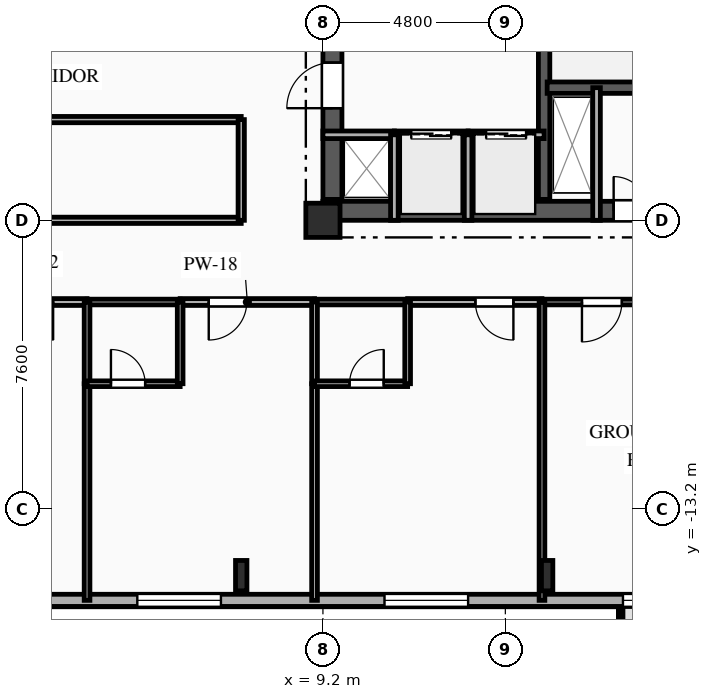
"""IFC4 building model, lengths in metres.
Left out: names, types, materials, properties, quantities, classifications, styles, units other than length and angle.
Written with IfcOpenShell. Run it as: python <this file> out.ifc"""

import sys

from ifc_helpers import new_model, si_unit, direction, frame, frame_2d, origin, origin_2d, place, context, subcontext, project, spatial, rectangle, i_section, extrude, element, fill, save


model = new_model("IFC4")
c1 = context("Model", 3, precision=1e-05, world=origin(), true_north=direction((0.0, 1.0)))
c2 = subcontext(c1, "Body", "Model", "MODEL_VIEW")
j1 = project(units=[si_unit("LENGTHUNIT", "METRE"), si_unit("PLANEANGLEUNIT", "RADIAN")], contexts=[c1])
p1 = place(None, origin())
s1 = spatial("IfcSite", under=j1, at=p1, CompositionType="ELEMENT")
p2 = place(p1, origin())
s2 = spatial("IfcBuilding", under=s1, at=p2, CompositionType="ELEMENT")
p3 = place(p2, frame((0.0, 0.0, 154.45)))
s3 = spatial("IfcBuildingStorey", under=s2, at=p3, CompositionType="ELEMENT", Elevation=154.45)
p4 = place(p3, frame((9.2, -5.6, 0.0), z_axis=(0.0, 0.0, 1.0), x_axis=(1.0, 0.0, 0.0)))
e1 = element("IfcColumn", 1, at=p4, inside=s3, PredefinedType="COLUMN", context=c2, shape_type="SweptSolid", body=[
    extrude(rectangle(XDim=0.9, YDim=0.9, at=origin_2d()), origin(), (0.0, 0.0, 1.0), 3.35),
])
for number, where, z_axis, x_axis in (
    (2, (7.05, -14.95, 0.0), (0.0, 0.0, 1.0), (1.0, 0.0, 0.0)),
    (3, (15.1, -14.95, 0.0), (0.0, 0.0, 1.0), (1.0, 0.0, 0.0)),
):
    element("IfcColumn", number, at=place(p3, frame(where, z_axis=z_axis, x_axis=x_axis)), inside=s3, PredefinedType="COLUMN", context=c2, shape_type="SweptSolid", body=[
        extrude(i_section(OverallWidth=0.3, OverallDepth=0.8, WebThickness=0.018, FlangeThickness=0.033, FilletRadius=0.03, at=origin_2d()), origin(), (0.0, 0.0, 1.0), 3.35),
    ])
p5 = place(p3, frame((23.8, -15.6, 0.0), z_axis=(0.0, 0.0, 1.0), x_axis=(-1.0, 0.0, 0.0)))
e4 = element("IfcWall", 4, at=p5, inside=s3, PredefinedType="SOLIDWALL", context=c2, shape_type="SweptSolid", body=[
    extrude(rectangle(XDim=49.6, YDim=0.32, at=frame_2d((24.8, 0.0))), origin(), (0.0, 0.0, 1.0), 3.04),
])
p6 = place(p5, frame((1.13, 0.0, 0.85)))
e5 = element("IfcOpeningElement", 5, at=p6, cuts=e4, PredefinedType="OPENING", context=c2, shape_type="SweptSolid", body=[
    extrude(rectangle(XDim=1.1, YDim=1.85, at=frame_2d((0.55, 0.925))), frame((0.0, 0.17, 0.0), z_axis=(0.0, -1.0, 0.0), x_axis=(1.0, 0.0, 0.0)), (0.0, 0.0, 1.0), 0.34),
])
p7 = place(p5, frame((5.055, 0.0, 0.85)))
e6 = element("IfcOpeningElement", 6, at=p7, cuts=e4, PredefinedType="OPENING", context=c2, shape_type="SweptSolid", body=[
    extrude(rectangle(XDim=1.65, YDim=1.85, at=frame_2d((0.825, 0.925))), frame((0.0, 0.17, 0.0), z_axis=(0.0, -1.0, 0.0), x_axis=(1.0, 0.0, 0.0)), (0.0, 0.0, 1.0), 0.34),
])
p8 = place(p5, frame((10.78, 0.0, 0.85)))
e7 = element("IfcOpeningElement", 7, at=p8, cuts=e4, PredefinedType="OPENING", context=c2, shape_type="SweptSolid", body=[
    extrude(rectangle(XDim=2.2, YDim=1.85, at=frame_2d((1.1, 0.925))), frame((0.0, 0.17, 0.0), z_axis=(0.0, -1.0, 0.0), x_axis=(1.0, 0.0, 0.0)), (0.0, 0.0, 1.0), 0.34),
])
p9 = place(p5, frame((17.284, 0.0, 0.85)))
e8 = element("IfcOpeningElement", 8, at=p9, cuts=e4, PredefinedType="OPENING", context=c2, shape_type="SweptSolid", body=[
    extrude(rectangle(XDim=2.2, YDim=1.85, at=frame_2d((1.1, 0.925))), frame((0.0, 0.17, 0.0), z_axis=(0.0, -1.0, 0.0), x_axis=(1.0, 0.0, 0.0)), (0.0, 0.0, 1.0), 0.34),
])
p10 = place(p5, frame((22.248, 0.0, 0.85)))
e9 = element("IfcOpeningElement", 9, at=p10, cuts=e4, PredefinedType="OPENING", context=c2, shape_type="SweptSolid", body=[
    extrude(rectangle(XDim=2.2, YDim=1.85, at=frame_2d((1.1, 0.925))), frame((0.0, 0.17, 0.0), z_axis=(0.0, -1.0, 0.0), x_axis=(1.0, 0.0, 0.0)), (0.0, 0.0, 1.0), 0.34),
])
p11 = place(p5, frame((28.7, 0.0, 0.85)))
e10 = element("IfcOpeningElement", 10, at=p11, cuts=e4, PredefinedType="OPENING", context=c2, shape_type="SweptSolid", body=[
    extrude(rectangle(XDim=2.2, YDim=1.85, at=frame_2d((1.1, 0.925))), frame((0.0, 0.17, 0.0), z_axis=(0.0, -1.0, 0.0), x_axis=(1.0, 0.0, 0.0)), (0.0, 0.0, 1.0), 0.34),
])
p12 = place(p5, frame((34.7, 0.0, 0.85)))
e11 = element("IfcOpeningElement", 11, at=p12, cuts=e4, PredefinedType="OPENING", context=c2, shape_type="SweptSolid", body=[
    extrude(rectangle(XDim=2.2, YDim=1.85, at=frame_2d((1.1, 0.925))), frame((0.0, 0.17, 0.0), z_axis=(0.0, -1.0, 0.0), x_axis=(1.0, 0.0, 0.0)), (0.0, 0.0, 1.0), 0.34),
])
p13 = place(p5, frame((41.492, 0.0, 0.85)))
e12 = element("IfcOpeningElement", 12, at=p13, cuts=e4, PredefinedType="OPENING", context=c2, shape_type="SweptSolid", body=[
    extrude(rectangle(XDim=1.65, YDim=1.85, at=frame_2d((0.825, 0.925))), frame((0.0, 0.17, 0.0), z_axis=(0.0, -1.0, 0.0), x_axis=(1.0, 0.0, 0.0)), (0.0, 0.0, 1.0), 0.34),
])
p14 = place(p5, frame((46.175, 0.0, 0.85)))
e13 = element("IfcOpeningElement", 13, at=p14, cuts=e4, PredefinedType="OPENING", context=c2, shape_type="SweptSolid", body=[
    extrude(rectangle(XDim=1.65, YDim=1.85, at=frame_2d((0.825, 0.925))), frame((0.0, 0.17, 0.0), z_axis=(0.0, -1.0, 0.0), x_axis=(1.0, 0.0, 0.0)), (0.0, 0.0, 1.0), 0.34),
])
p15 = place(p3, frame((9.2, -5.35, 0.0), z_axis=(0.0, 0.0, 1.0), x_axis=(1.0, 0.0, 0.0)))
e14 = element("IfcWall", 14, at=p15, inside=s3, PredefinedType="SHEAR", context=c2, shape_type="SweptSolid", body=[
    extrude(rectangle(XDim=9.6, YDim=0.5, at=frame_2d((4.8, 0.0))), origin(), (0.0, 0.0, 1.0), 3.04),
])
p16 = place(p15, frame((7.65, 0.0, 0.0)))
e15 = element("IfcOpeningElement", 15, at=p16, cuts=e14, PredefinedType="OPENING", context=c2, shape_type="SweptSolid", body=[
    extrude(rectangle(XDim=0.9, YDim=2.1, at=frame_2d((0.45, 1.05))), frame((0.0, 0.26, 0.0), z_axis=(0.0, -1.0, 0.0), x_axis=(1.0, 0.0, 0.0)), (0.0, 0.0, 1.0), 0.52),
])
p17 = place(p3, frame((9.45, -5.05, 0.0), z_axis=(0.0, 0.0, 1.0), x_axis=(0.0, 1.0, 0.0)))
e16 = element("IfcWall", 16, at=p17, inside=s3, PredefinedType="SHEAR", context=c2, shape_type="SweptSolid", body=[
    extrude(rectangle(XDim=10.1, YDim=0.5, at=frame_2d((5.05, 0.0))), origin(), (0.0, 0.0, 1.0), 3.04),
])
p18 = place(p17, frame((7.15, 0.0, 0.0)))
e17 = element("IfcOpeningElement", 17, at=p18, cuts=e16, PredefinedType="OPENING", context=c2, shape_type="SweptSolid", body=[
    extrude(rectangle(XDim=0.9, YDim=2.1, at=frame_2d((0.45, 1.05))), frame((0.0, 0.26, 0.0), z_axis=(0.0, -1.0, 0.0), x_axis=(1.0, 0.0, 0.0)), (0.0, 0.0, 1.0), 0.52),
])
p19 = place(p17, frame((2.4, 0.0, 0.0)))
e18 = element("IfcOpeningElement", 18, at=p19, cuts=e16, PredefinedType="OPENING", context=c2, shape_type="SweptSolid", body=[
    extrude(rectangle(XDim=1.2, YDim=2.15, at=frame_2d((0.6, 1.075))), frame((0.0, 0.26, 0.0), z_axis=(0.0, -1.0, 0.0), x_axis=(1.0, 0.0, 0.0)), (0.0, 0.0, 1.0), 0.52),
])
p20 = place(p3, frame((15.02, -5.05, 0.0), z_axis=(0.0, 0.0, 1.0), x_axis=(0.0, 1.0, 0.0)))
e19 = element("IfcWall", 19, at=p20, inside=s3, PredefinedType="SHEAR", context=c2, shape_type="SweptSolid", body=[
    extrude(rectangle(XDim=10.1, YDim=0.3, at=frame_2d((5.05, 0.0))), origin(), (0.0, 0.0, 1.0), 3.04),
])
p21 = place(p3, frame((15.1, -2.11, 0.0), z_axis=(0.0, 0.0, 1.0), x_axis=(1.0, 0.0, 0.0)))
e20 = element("IfcWall", 20, at=p21, inside=s3, PredefinedType="SHEAR", context=c2, shape_type="SweptSolid", body=[
    extrude(rectangle(XDim=3.18, YDim=0.3, at=frame_2d((1.59, 0.0))), origin(), (0.0, 0.0, 1.0), 3.04),
])
p22 = place(p3, frame((16.4, -2.11, 0.0), z_axis=(0.0, 0.0, 1.0), x_axis=(0.0, -1.0, 0.0)))
e21 = element("IfcWall", 21, at=p22, inside=s3, PredefinedType="PARTITIONING", context=c2, shape_type="SweptSolid", body=[
    extrude(rectangle(XDim=3.49, YDim=0.2, at=frame_2d((1.745, 0.0))), origin(), (0.0, 0.0, 1.0), 3.04),
])
p23 = place(p3, frame((9.2, -3.35, 0.0), z_axis=(0.0, 0.0, 1.0), x_axis=(1.0, 0.0, 0.0)))
e22 = element("IfcWall", 22, at=p23, inside=s3, PredefinedType="PARTITIONING", context=c2, shape_type="SweptSolid", body=[
    extrude(rectangle(XDim=1.88, YDim=0.2, at=frame_2d((0.94, 0.0))), origin(), (0.0, 0.0, 1.0), 2.755),
])
p24 = place(p3, frame((11.08, -3.35, 0.0), z_axis=(0.0, 0.0, 1.0), x_axis=(1.0, 0.0, 0.0)))
e23 = element("IfcWall", 23, at=p24, inside=s3, PredefinedType="PARTITIONING", context=c2, shape_type="SweptSolid", body=[
    extrude(rectangle(XDim=1.94, YDim=0.2, at=frame_2d((0.97, 0.0))), origin(), (0.0, 0.0, 1.0), 3.04),
])
p25 = place(p24, frame((0.445, 0.0, 0.0)))
e24 = element("IfcOpeningElement", 24, at=p25, cuts=e23, PredefinedType="OPENING", context=c2, shape_type="SweptSolid", body=[
    extrude(rectangle(XDim=1.05, YDim=2.1, at=frame_2d((0.525, 1.05))), frame((0.0, 0.11, 0.0), z_axis=(0.0, -1.0, 0.0), x_axis=(1.0, 0.0, 0.0)), (0.0, 0.0, 1.0), 0.22),
])
p26 = place(p3, frame((13.02, -3.35, 0.0), z_axis=(0.0, 0.0, 1.0), x_axis=(1.0, 0.0, 0.0)))
e25 = element("IfcWall", 25, at=p26, inside=s3, PredefinedType="PARTITIONING", context=c2, shape_type="SweptSolid", body=[
    extrude(rectangle(XDim=2.0, YDim=0.2, at=frame_2d((1.0, 0.0))), origin(), (0.0, 0.0, 1.0), 3.04),
])
p27 = place(p26, frame((0.475, 0.0, 0.0)))
e26 = element("IfcOpeningElement", 26, at=p27, cuts=e25, PredefinedType="OPENING", context=c2, shape_type="SweptSolid", body=[
    extrude(rectangle(XDim=1.05, YDim=2.1, at=frame_2d((0.525, 1.05))), frame((0.0, 0.11, 0.0), z_axis=(0.0, -1.0, 0.0), x_axis=(1.0, 0.0, 0.0)), (0.0, 0.0, 1.0), 0.22),
])
for number, where, z_axis, x_axis in (
    (27, (11.08, -5.6, 0.0), (0.0, 0.0, 1.0), (0.0, 1.0, 0.0)),
    (28, (13.02, -5.6, 0.0), (0.0, 0.0, 1.0), (0.0, 1.0, 0.0)),
):
    element("IfcWall", number, at=place(p3, frame(where, z_axis=z_axis, x_axis=x_axis)), inside=s3, PredefinedType="PARTITIONING", context=c2, shape_type="SweptSolid", body=[
        extrude(rectangle(XDim=2.25, YDim=0.2, at=frame_2d((1.125, 0.0))), origin(), (0.0, 0.0, 1.0), 3.04),
    ])
p28 = place(p3, frame((2.993, -7.75, 0.0), z_axis=(0.0, 0.0, 1.0), x_axis=(-1.0, 0.0, 0.0)))
e29 = element("IfcWall", 29, at=p28, inside=s3, PredefinedType="PARTITIONING", context=c2, shape_type="SweptSolid", body=[
    extrude(rectangle(XDim=2.993, YDim=0.18, at=frame_2d((1.497, 0.0))), origin(), (0.0, 0.0, 1.0), 3.04),
])
p29 = place(p28, frame((0.892, 0.0, 0.0)))
e30 = element("IfcOpeningElement", 30, at=p29, cuts=e29, PredefinedType="OPENING", context=c2, shape_type="SweptSolid", body=[
    extrude(rectangle(XDim=1.0, YDim=2.15, at=frame_2d((0.5, 1.075))), frame((0.0, 0.1, 0.0), z_axis=(0.0, -1.0, 0.0), x_axis=(1.0, 0.0, 0.0)), (0.0, 0.0, 1.0), 0.2),
])
p30 = place(p3, frame((8.979, -7.75, 0.0), z_axis=(0.0, 0.0, 1.0), x_axis=(-1.0, 0.0, 0.0)))
e31 = element("IfcWall", 31, at=p30, inside=s3, PredefinedType="PARTITIONING", context=c2, shape_type="SweptSolid", body=[
    extrude(rectangle(XDim=3.536, YDim=0.18, at=frame_2d((1.768, 0.0))), origin(), (0.0, 0.0, 1.0), 3.04),
])
p31 = place(p30, frame((1.784, 0.0, 0.0)))
e32 = element("IfcOpeningElement", 32, at=p31, cuts=e31, PredefinedType="OPENING", context=c2, shape_type="SweptSolid", body=[
    extrude(rectangle(XDim=1.0, YDim=2.15, at=frame_2d((0.5, 1.075))), frame((0.0, 0.1, 0.0), z_axis=(0.0, -1.0, 0.0), x_axis=(1.0, 0.0, 0.0)), (0.0, 0.0, 1.0), 0.2),
])
p32 = place(p3, frame((5.443, -7.75, 0.0), z_axis=(0.0, 0.0, 1.0), x_axis=(-1.0, 0.0, 0.0)))
e33 = element("IfcWall", 33, at=p32, inside=s3, PredefinedType="PLUMBINGWALL", context=c2, shape_type="SweptSolid", body=[
    extrude(rectangle(XDim=2.45, YDim=0.15, at=frame_2d((1.225, 0.0))), origin(), (0.0, 0.0, 1.0), 3.04),
])
p33 = place(p3, frame((14.964, -7.75, 0.0), z_axis=(0.0, 0.0, 1.0), x_axis=(-1.0, 0.0, 0.0)))
e34 = element("IfcWall", 34, at=p33, inside=s3, PredefinedType="PARTITIONING", context=c2, shape_type="SweptSolid", body=[
    extrude(rectangle(XDim=3.535, YDim=0.18, at=frame_2d((1.768, 0.0))), origin(), (0.0, 0.0, 1.0), 3.04),
])
p34 = place(p33, frame((0.752, 0.0, 0.0)))
e35 = element("IfcOpeningElement", 35, at=p34, cuts=e34, PredefinedType="OPENING", context=c2, shape_type="SweptSolid", body=[
    extrude(rectangle(XDim=1.0, YDim=2.15, at=frame_2d((0.5, 1.075))), frame((0.0, 0.1, 0.0), z_axis=(0.0, -1.0, 0.0), x_axis=(1.0, 0.0, 0.0)), (0.0, 0.0, 1.0), 0.2),
])
p35 = place(p3, frame((11.429, -7.75, 0.0), z_axis=(0.0, 0.0, 1.0), x_axis=(-1.0, 0.0, 0.0)))
e36 = element("IfcWall", 36, at=p35, inside=s3, PredefinedType="PLUMBINGWALL", context=c2, shape_type="SweptSolid", body=[
    extrude(rectangle(XDim=2.45, YDim=0.15, at=frame_2d((1.225, 0.0))), origin(), (0.0, 0.0, 1.0), 3.04),
])
p36 = place(p3, frame((20.95, -7.75, 0.0), z_axis=(0.0, 0.0, 1.0), x_axis=(-1.0, 0.0, 0.0)))
e37 = element("IfcWall", 37, at=p36, inside=s3, PredefinedType="PARTITIONING", context=c2, shape_type="SweptSolid", body=[
    extrude(rectangle(XDim=5.986, YDim=0.15, at=frame_2d((2.993, 0.0))), origin(), (0.0, 0.0, 1.0), 3.04),
])
p37 = place(p36, frame((3.884, 0.0, 0.0)))
e38 = element("IfcOpeningElement", 38, at=p37, cuts=e37, PredefinedType="OPENING", context=c2, shape_type="SweptSolid", body=[
    extrude(rectangle(XDim=1.05, YDim=2.15, at=frame_2d((0.525, 1.075))), frame((0.0, 0.085, 0.0), z_axis=(0.0, -1.0, 0.0), x_axis=(1.0, 0.0, 0.0)), (0.0, 0.0, 1.0), 0.17),
])
p38 = place(p3, frame((0.0, -5.6, 0.0), z_axis=(0.0, 0.0, 1.0), x_axis=(1.0, 0.0, 0.0)))
e39 = element("IfcWall", 39, at=p38, inside=s3, PredefinedType="PARTITIONING", context=c2, shape_type="SweptSolid", body=[
    extrude(rectangle(XDim=7.05, YDim=0.165, at=frame_2d((3.525, 0.0))), origin(), (0.0, 0.0, 1.0), 2.525),
])
p39 = place(p3, frame((7.05, -2.95, 0.0), z_axis=(0.0, 0.0, 1.0), x_axis=(-1.0, 0.0, 0.0)))
e40 = element("IfcWall", 40, at=p39, inside=s3, PredefinedType="PARTITIONING", context=c2, shape_type="SweptSolid", body=[
    extrude(rectangle(XDim=14.1, YDim=0.165, at=frame_2d((7.05, 0.0))), origin(), (0.0, 0.0, 1.0), 3.04),
])
p40 = place(p39, frame((6.475, 0.0, 0.0)))
e41 = element("IfcOpeningElement", 41, at=p40, cuts=e40, PredefinedType="OPENING", context=c2, shape_type="SweptSolid", body=[
    extrude(rectangle(XDim=1.15, YDim=2.15, at=frame_2d((0.575, 1.075))), frame((0.0, 0.093, 0.0), z_axis=(0.0, -1.0, 0.0), x_axis=(1.0, 0.0, 0.0)), (0.0, 0.0, 1.0), 0.185),
])
p41 = place(p3, frame((7.05, -5.6, 0.0), z_axis=(0.0, 0.0, 1.0), x_axis=(0.0, 1.0, 0.0)))
e42 = element("IfcWall", 42, at=p41, inside=s3, PredefinedType="PARTITIONING", context=c2, shape_type="SweptSolid", body=[
    extrude(rectangle(XDim=2.65, YDim=0.165, at=frame_2d((1.325, 0.0))), origin(), (0.0, 0.0, 1.0), 3.04),
])
p42 = place(p3, frame((2.993, -9.9, 0.0), z_axis=(0.0, 0.0, 1.0), x_axis=(0.0, -1.0, 0.0)))
e43 = element("IfcWall", 43, at=p42, inside=s3, PredefinedType="PARTITIONING", context=c2, shape_type="SweptSolid", body=[
    extrude(rectangle(XDim=5.7, YDim=0.15, at=frame_2d((2.85, 0.0))), origin(), (0.0, 0.0, 1.0), 3.04),
])
p43 = place(p3, frame((2.993, -7.75, 0.0), z_axis=(0.0, 0.0, 1.0), x_axis=(0.0, -1.0, 0.0)))
e44 = element("IfcWall", 44, at=p43, inside=s3, PredefinedType="PLUMBINGWALL", context=c2, shape_type="SweptSolid", body=[
    extrude(rectangle(XDim=2.15, YDim=0.15, at=frame_2d((1.075, 0.0))), origin(), (0.0, 0.0, 1.0), 3.04),
])
p44 = place(p3, frame((2.993, -9.9, 0.0), z_axis=(0.0, 0.0, 1.0), x_axis=(1.0, 0.0, 0.0)))
e45 = element("IfcWall", 45, at=p44, inside=s3, PredefinedType="PLUMBINGWALL", context=c2, shape_type="SweptSolid", body=[
    extrude(rectangle(XDim=2.45, YDim=0.15, at=frame_2d((1.225, 0.0))), origin(), (0.0, 0.0, 1.0), 3.04),
])
p45 = place(p44, frame((0.629, 0.0, 0.0)))
e46 = element("IfcOpeningElement", 46, at=p45, cuts=e45, PredefinedType="OPENING", context=c2, shape_type="SweptSolid", body=[
    extrude(rectangle(XDim=0.9, YDim=2.1, at=frame_2d((0.45, 1.05))), frame((0.0, 0.085, 0.0), z_axis=(0.0, -1.0, 0.0), x_axis=(1.0, 0.0, 0.0)), (0.0, 0.0, 1.0), 0.17),
])
p46 = place(p3, frame((5.443, -9.9, 0.0), z_axis=(0.0, 0.0, 1.0), x_axis=(0.0, 1.0, 0.0)))
e47 = element("IfcWall", 47, at=p46, inside=s3, PredefinedType="PLUMBINGWALL", context=c2, shape_type="SweptSolid", body=[
    extrude(rectangle(XDim=2.15, YDim=0.15, at=frame_2d((1.075, 0.0))), origin(), (0.0, 0.0, 1.0), 3.04),
])
p47 = place(p3, frame((8.979, -9.9, 0.0), z_axis=(0.0, 0.0, 1.0), x_axis=(0.0, -1.0, 0.0)))
e48 = element("IfcWall", 48, at=p47, inside=s3, PredefinedType="PARTITIONING", context=c2, shape_type="SweptSolid", body=[
    extrude(rectangle(XDim=5.7, YDim=0.15, at=frame_2d((2.85, 0.0))), origin(), (0.0, 0.0, 1.0), 3.04),
])
p48 = place(p3, frame((8.979, -7.75, 0.0), z_axis=(0.0, 0.0, 1.0), x_axis=(0.0, -1.0, 0.0)))
e49 = element("IfcWall", 49, at=p48, inside=s3, PredefinedType="PLUMBINGWALL", context=c2, shape_type="SweptSolid", body=[
    extrude(rectangle(XDim=2.15, YDim=0.15, at=frame_2d((1.075, 0.0))), origin(), (0.0, 0.0, 1.0), 3.04),
])
p49 = place(p3, frame((8.979, -9.9, 0.0), z_axis=(0.0, 0.0, 1.0), x_axis=(1.0, 0.0, 0.0)))
e50 = element("IfcWall", 50, at=p49, inside=s3, PredefinedType="PLUMBINGWALL", context=c2, shape_type="SweptSolid", body=[
    extrude(rectangle(XDim=2.45, YDim=0.15, at=frame_2d((1.225, 0.0))), origin(), (0.0, 0.0, 1.0), 3.04),
])
p50 = place(p49, frame((0.921, 0.0, 0.0)))
e51 = element("IfcOpeningElement", 51, at=p50, cuts=e50, PredefinedType="OPENING", context=c2, shape_type="SweptSolid", body=[
    extrude(rectangle(XDim=0.9, YDim=2.1, at=frame_2d((0.45, 1.05))), frame((0.0, 0.085, 0.0), z_axis=(0.0, -1.0, 0.0), x_axis=(1.0, 0.0, 0.0)), (0.0, 0.0, 1.0), 0.17),
])
p51 = place(p3, frame((11.429, -9.9, 0.0), z_axis=(0.0, 0.0, 1.0), x_axis=(0.0, 1.0, 0.0)))
e52 = element("IfcWall", 52, at=p51, inside=s3, PredefinedType="PLUMBINGWALL", context=c2, shape_type="SweptSolid", body=[
    extrude(rectangle(XDim=2.15, YDim=0.15, at=frame_2d((1.075, 0.0))), origin(), (0.0, 0.0, 1.0), 3.04),
])
p52 = place(p3, frame((14.964, -7.75, 0.0), z_axis=(0.0, 0.0, 1.0), x_axis=(0.0, -1.0, 0.0)))
e53 = element("IfcWall", 53, at=p52, inside=s3, PredefinedType="PARTITIONING", context=c2, shape_type="SweptSolid", body=[
    extrude(rectangle(XDim=7.85, YDim=0.15, at=frame_2d((3.925, 0.0))), origin(), (0.0, 0.0, 1.0), 3.04),
])
p53 = place(p7, origin())
e54 = element("IfcWindow", 54, at=p53, inside=s3, PartitioningType="SINGLE_PANEL", PredefinedType="WINDOW", context=c2, shape_type="SweptSolid", body=[
    extrude(rectangle(XDim=1.65, YDim=1.85, at=frame_2d((0.825, 0.925))), frame((0.0, 0.03, 0.0), z_axis=(0.0, -1.0, 0.0), x_axis=(1.0, 0.0, 0.0)), (0.0, 0.0, 1.0), 0.06),
])
fill(e6, e54)
p54 = place(p8, origin())
e55 = element("IfcWindow", 55, at=p54, inside=s3, PartitioningType="SINGLE_PANEL", PredefinedType="WINDOW", context=c2, shape_type="SweptSolid", body=[
    extrude(rectangle(XDim=2.2, YDim=1.85, at=frame_2d((1.1, 0.925))), frame((0.0, 0.03, 0.0), z_axis=(0.0, -1.0, 0.0), x_axis=(1.0, 0.0, 0.0)), (0.0, 0.0, 1.0), 0.06),
])
fill(e7, e55)
p55 = place(p9, origin())
e56 = element("IfcWindow", 56, at=p55, inside=s3, PartitioningType="SINGLE_PANEL", PredefinedType="WINDOW", context=c2, shape_type="SweptSolid", body=[
    extrude(rectangle(XDim=2.2, YDim=1.85, at=frame_2d((1.1, 0.925))), frame((0.0, 0.03, 0.0), z_axis=(0.0, -1.0, 0.0), x_axis=(1.0, 0.0, 0.0)), (0.0, 0.0, 1.0), 0.06),
])
fill(e8, e56)
p56 = place(p16, origin())
e57 = element("IfcDoor", 57, at=p56, inside=s3, OperationType="SINGLE_SWING_LEFT", PredefinedType="DOOR", context=c2, shape_type="SweptSolid", body=[
    extrude(rectangle(XDim=0.9, YDim=2.1, at=frame_2d((0.45, 1.05))), frame((0.0, 0.025, 0.0), z_axis=(0.0, -1.0, 0.0), x_axis=(1.0, 0.0, 0.0)), (0.0, 0.0, 1.0), 0.05),
])
fill(e15, e57)
p57 = place(p25, origin())
e58 = element("IfcDoor", 58, at=p57, inside=s3, OperationType="DOUBLE_DOOR_SLIDING", PredefinedType="DOOR", context=c2, shape_type="SweptSolid", body=[
    extrude(rectangle(XDim=1.05, YDim=2.1, at=frame_2d((0.525, 1.05))), frame((0.0, 0.025, 0.0), z_axis=(0.0, -1.0, 0.0), x_axis=(1.0, 0.0, 0.0)), (0.0, 0.0, 1.0), 0.05),
])
fill(e24, e58)
p58 = place(p27, origin())
e59 = element("IfcDoor", 59, at=p58, inside=s3, OperationType="DOUBLE_DOOR_SLIDING", PredefinedType="DOOR", context=c2, shape_type="SweptSolid", body=[
    extrude(rectangle(XDim=1.05, YDim=2.1, at=frame_2d((0.525, 1.05))), frame((0.0, 0.025, 0.0), z_axis=(0.0, -1.0, 0.0), x_axis=(1.0, 0.0, 0.0)), (0.0, 0.0, 1.0), 0.05),
])
fill(e26, e59)
p59 = place(p19, origin())
e60 = element("IfcDoor", 60, at=p59, inside=s3, OperationType="SINGLE_SWING_LEFT", PredefinedType="DOOR", context=c2, shape_type="SweptSolid", body=[
    extrude(rectangle(XDim=1.2, YDim=2.15, at=frame_2d((0.6, 1.075))), frame((0.0, 0.025, 0.0), z_axis=(0.0, -1.0, 0.0), x_axis=(1.0, 0.0, 0.0)), (0.0, 0.0, 1.0), 0.05),
])
fill(e18, e60)
p60 = place(p29, origin())
e61 = element("IfcDoor", 61, at=p60, inside=s3, OperationType="SINGLE_SWING_LEFT", PredefinedType="DOOR", context=c2, shape_type="SweptSolid", body=[
    extrude(rectangle(XDim=1.0, YDim=2.15, at=frame_2d((0.5, 1.075))), frame((0.0, 0.025, 0.0), z_axis=(0.0, -1.0, 0.0), x_axis=(1.0, 0.0, 0.0)), (0.0, 0.0, 1.0), 0.05),
])
fill(e30, e61)
p61 = place(p31, origin())
e62 = element("IfcDoor", 62, at=p61, inside=s3, OperationType="SINGLE_SWING_RIGHT", PredefinedType="DOOR", context=c2, shape_type="SweptSolid", body=[
    extrude(rectangle(XDim=1.0, YDim=2.15, at=frame_2d((0.5, 1.075))), frame((0.0, 0.025, 0.0), z_axis=(0.0, -1.0, 0.0), x_axis=(1.0, 0.0, 0.0)), (0.0, 0.0, 1.0), 0.05),
])
fill(e32, e62)
p62 = place(p34, origin())
e63 = element("IfcDoor", 63, at=p62, inside=s3, OperationType="SINGLE_SWING_LEFT", PredefinedType="DOOR", context=c2, shape_type="SweptSolid", body=[
    extrude(rectangle(XDim=1.0, YDim=2.15, at=frame_2d((0.5, 1.075))), frame((0.0, 0.025, 0.0), z_axis=(0.0, -1.0, 0.0), x_axis=(1.0, 0.0, 0.0)), (0.0, 0.0, 1.0), 0.05),
])
fill(e35, e63)
p63 = place(p37, origin())
e64 = element("IfcDoor", 64, at=p63, inside=s3, OperationType="SINGLE_SWING_RIGHT", PredefinedType="DOOR", context=c2, shape_type="SweptSolid", body=[
    extrude(rectangle(XDim=1.05, YDim=2.15, at=frame_2d((0.525, 1.075))), frame((0.0, 0.025, 0.0), z_axis=(0.0, -1.0, 0.0), x_axis=(1.0, 0.0, 0.0)), (0.0, 0.0, 1.0), 0.05),
])
fill(e38, e64)
p64 = place(p45, origin())
e65 = element("IfcDoor", 65, at=p64, inside=s3, OperationType="SINGLE_SWING_LEFT", PredefinedType="DOOR", context=c2, shape_type="SweptSolid", body=[
    extrude(rectangle(XDim=0.9, YDim=2.1, at=frame_2d((0.45, 1.05))), frame((0.0, 0.025, 0.0), z_axis=(0.0, -1.0, 0.0), x_axis=(1.0, 0.0, 0.0)), (0.0, 0.0, 1.0), 0.05),
])
fill(e46, e65)
p65 = place(p50, origin())
e66 = element("IfcDoor", 66, at=p65, inside=s3, OperationType="SINGLE_SWING_RIGHT", PredefinedType="DOOR", context=c2, shape_type="SweptSolid", body=[
    extrude(rectangle(XDim=0.9, YDim=2.1, at=frame_2d((0.45, 1.05))), frame((0.0, 0.025, 0.0), z_axis=(0.0, -1.0, 0.0), x_axis=(1.0, 0.0, 0.0)), (0.0, 0.0, 1.0), 0.05),
])
fill(e51, e66)
save(model, sys.argv[1])
